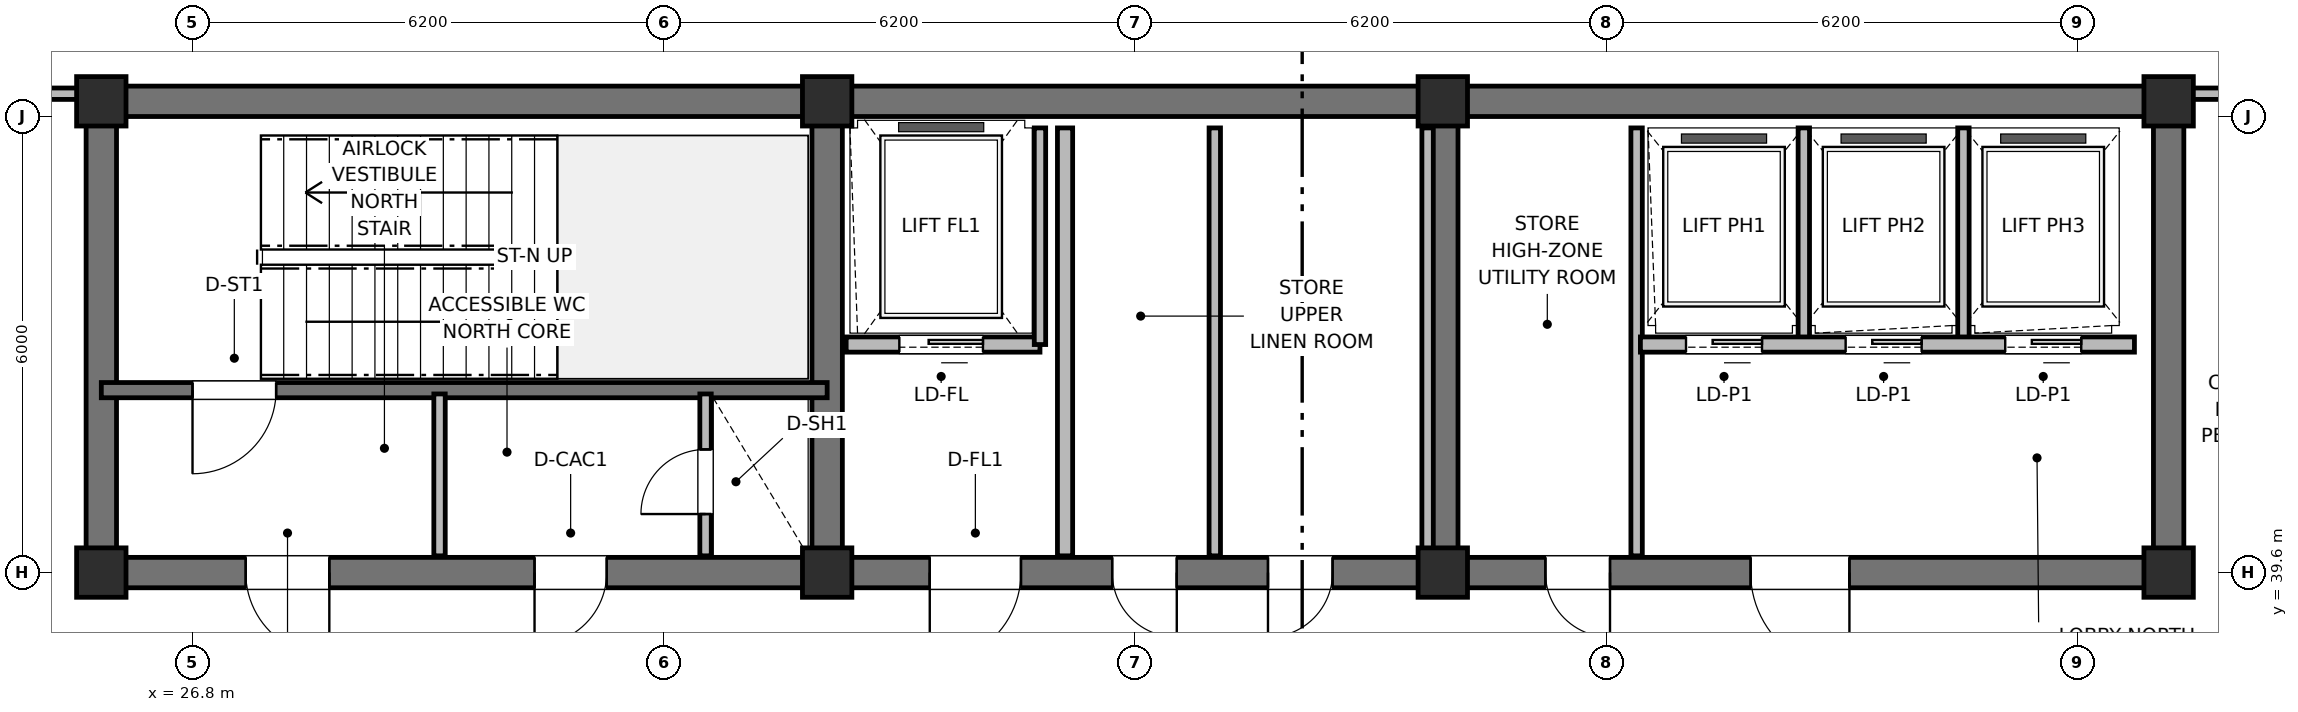
"""IFC4 building model, lengths in metres.
Left out: names, types, materials, properties, quantities, classifications, styles, units other than length and angle.
Written with IfcOpenShell. Run it as: python <this file> out.ifc"""

import sys

from ifc_helpers import new_model, si_unit, direction, frame, frame_2d, origin, origin_2d, place, context, subcontext, project, spatial, rectangle, extrude, element, fill, save


model = new_model("IFC4")
c1 = context("Model", 3, precision=1e-05, world=origin(), true_north=direction((0.0, 1.0)))
c2 = subcontext(c1, "Body", "Model", "MODEL_VIEW")
j1 = project(units=[si_unit("LENGTHUNIT", "METRE"), si_unit("PLANEANGLEUNIT", "RADIAN")], contexts=[c1])
p1 = place(None, origin())
s1 = spatial("IfcSite", under=j1, at=p1, CompositionType="ELEMENT")
p2 = place(p1, origin())
s2 = spatial("IfcBuilding", under=s1, at=p2, CompositionType="ELEMENT")
p3 = place(p2, frame((0.0, 0.0, 297.2)))
s3 = spatial("IfcBuildingStorey", under=s2, at=p3, CompositionType="ELEMENT", Elevation=297.2)
p4 = place(p3, frame((25.6, 45.8, 0.0), z_axis=(0.0, 0.0, 1.0), x_axis=(1.0, 0.0, 0.0)))
e1 = element("IfcWall", 1, at=p4, inside=s3, PredefinedType="SHEAR", context=c2, shape_type="SweptSolid", body=[
    extrude(rectangle(XDim=27.2, YDim=0.4, at=frame_2d((13.6, 0.0))), origin(), (0.0, 0.0, 1.0), 4.8),
])
for number, where, z_axis, x_axis in (
    (2, (25.6, 39.8, 0.0), (0.0, 0.0, 1.0), (0.0, 1.0, 0.0)),
    (3, (52.8, 39.8, 0.0), (0.0, 0.0, 1.0), (0.0, 1.0, 0.0)),
):
    element("IfcWall", number, at=place(p3, frame(where, z_axis=z_axis, x_axis=x_axis)), inside=s3, PredefinedType="SHEAR", context=c2, shape_type="SweptSolid", body=[
        extrude(rectangle(XDim=5.8, YDim=0.4, at=frame_2d((2.9, 0.0))), origin(), (0.0, 0.0, 1.0), 4.8),
    ])
p5 = place(p3, frame((52.8, 39.6, 0.0), z_axis=(0.0, 0.0, 1.0), x_axis=(-1.0, 0.0, 0.0)))
e4 = element("IfcWall", 4, at=p5, inside=s3, PredefinedType="SHEAR", context=c2, shape_type="SweptSolid", body=[
    extrude(rectangle(XDim=27.2, YDim=0.4, at=frame_2d((13.6, 0.0))), origin(), (0.0, 0.0, 1.0), 4.8),
])
p6 = place(p5, frame((24.2, 0.0, 0.0)))
e5 = element("IfcOpeningElement", 5, at=p6, cuts=e4, PredefinedType="OPENING", context=c2, shape_type="SweptSolid", body=[
    extrude(rectangle(XDim=1.1, YDim=2.15, at=frame_2d((0.55, 1.075))), frame((0.0, 0.21, 0.0), z_axis=(0.0, -1.0, 0.0), x_axis=(1.0, 0.0, 0.0)), (0.0, 0.0, 1.0), 0.42),
])
p7 = place(p5, frame((20.55, 0.0, 0.0)))
e6 = element("IfcOpeningElement", 6, at=p7, cuts=e4, PredefinedType="OPENING", context=c2, shape_type="SweptSolid", body=[
    extrude(rectangle(XDim=0.95, YDim=2.1, at=frame_2d((0.475, 1.05))), frame((0.0, 0.21, 0.0), z_axis=(0.0, -1.0, 0.0), x_axis=(1.0, 0.0, 0.0)), (0.0, 0.0, 1.0), 0.42),
])
p8 = place(p5, frame((15.1, 0.0, 0.0)))
e7 = element("IfcOpeningElement", 7, at=p8, cuts=e4, PredefinedType="OPENING", context=c2, shape_type="SweptSolid", body=[
    extrude(rectangle(XDim=1.2, YDim=2.15, at=frame_2d((0.6, 1.075))), frame((0.0, 0.21, 0.0), z_axis=(0.0, -1.0, 0.0), x_axis=(1.0, 0.0, 0.0)), (0.0, 0.0, 1.0), 0.42),
])
p9 = place(p5, frame((13.05, 0.0, 0.0)))
e8 = element("IfcOpeningElement", 8, at=p9, cuts=e4, PredefinedType="OPENING", context=c2, shape_type="SweptSolid", body=[
    extrude(rectangle(XDim=0.85, YDim=2.1, at=frame_2d((0.425, 1.05))), frame((0.0, 0.21, 0.0), z_axis=(0.0, -1.0, 0.0), x_axis=(1.0, 0.0, 0.0)), (0.0, 0.0, 1.0), 0.42),
])
p10 = place(p5, frame((11.0, 0.0, 0.0)))
e9 = element("IfcOpeningElement", 9, at=p10, cuts=e4, PredefinedType="OPENING", context=c2, shape_type="SweptSolid", body=[
    extrude(rectangle(XDim=0.85, YDim=2.1, at=frame_2d((0.425, 1.05))), frame((0.0, 0.21, 0.0), z_axis=(0.0, -1.0, 0.0), x_axis=(1.0, 0.0, 0.0)), (0.0, 0.0, 1.0), 0.42),
])
p11 = place(p5, frame((7.35, 0.0, 0.0)))
e10 = element("IfcOpeningElement", 10, at=p11, cuts=e4, PredefinedType="OPENING", context=c2, shape_type="SweptSolid", body=[
    extrude(rectangle(XDim=0.85, YDim=2.1, at=frame_2d((0.425, 1.05))), frame((0.0, 0.21, 0.0), z_axis=(0.0, -1.0, 0.0), x_axis=(1.0, 0.0, 0.0)), (0.0, 0.0, 1.0), 0.42),
])
p12 = place(p5, frame((4.2, 0.0, 0.0)))
e11 = element("IfcOpeningElement", 11, at=p12, cuts=e4, PredefinedType="OPENING", context=c2, shape_type="SweptSolid", body=[
    extrude(rectangle(XDim=1.3, YDim=2.2, at=frame_2d((0.65, 1.1))), frame((0.0, 0.21, 0.0), z_axis=(0.0, -1.0, 0.0), x_axis=(1.0, 0.0, 0.0)), (0.0, 0.0, 1.0), 0.42),
])
for number, where, z_axis, x_axis in (
    (12, (35.15, 39.8, 0.0), (0.0, 0.0, 1.0), (0.0, 1.0, 0.0)),
    (13, (43.25, 39.8, 0.0), (0.0, 0.0, 1.0), (0.0, 1.0, 0.0)),
):
    element("IfcWall", number, at=place(p3, frame(where, z_axis=z_axis, x_axis=x_axis)), inside=s3, PredefinedType="SHEAR", context=c2, shape_type="SweptSolid", body=[
        extrude(rectangle(XDim=5.8, YDim=0.4, at=frame_2d((2.9, 0.0))), origin(), (0.0, 0.0, 1.0), 4.8),
    ])
for number, where, z_axis, x_axis in (
    (14, (25.6, 39.6, 0.0), (0.0, 0.0, 1.0), (1.0, 0.0, 0.0)),
    (15, (25.6, 45.8, 0.0), (0.0, 0.0, 1.0), (1.0, 0.0, 0.0)),
    (16, (35.15, 39.6, 0.0), (0.0, 0.0, 1.0), (1.0, 0.0, 0.0)),
    (17, (35.15, 45.8, 0.0), (0.0, 0.0, 1.0), (1.0, 0.0, 0.0)),
    (18, (43.25, 39.6, 0.0), (0.0, 0.0, 1.0), (1.0, 0.0, 0.0)),
    (19, (43.25, 45.8, 0.0), (0.0, 0.0, 1.0), (1.0, 0.0, 0.0)),
    (20, (52.8, 39.6, 0.0), (0.0, 0.0, 1.0), (1.0, 0.0, 0.0)),
    (21, (52.8, 45.8, 0.0), (0.0, 0.0, 1.0), (1.0, 0.0, 0.0)),
):
    element("IfcColumn", number, at=place(p3, frame(where, z_axis=z_axis, x_axis=x_axis)), inside=s3, PredefinedType="COLUMN", context=c2, shape_type="SweptSolid", body=[
        extrude(rectangle(XDim=0.65, YDim=0.65, at=origin_2d()), origin(), (0.0, 0.0, 1.0), 4.8),
    ])
p13 = place(p3, frame((35.15, 42.0, 0.0), z_axis=(0.0, 0.0, 1.0), x_axis=(-1.0, 0.0, 0.0)))
e22 = element("IfcWall", 22, at=p13, inside=s3, PredefinedType="SHEAR", context=c2, shape_type="SweptSolid", body=[
    extrude(rectangle(XDim=9.55, YDim=0.2, at=frame_2d((4.775, 0.0))), origin(), (0.0, 0.0, 1.0), 4.8),
])
p14 = place(p13, frame((7.25, 0.0, 0.0)))
e23 = element("IfcOpeningElement", 23, at=p14, cuts=e22, PredefinedType="OPENING", context=c2, shape_type="SweptSolid", body=[
    extrude(rectangle(XDim=1.1, YDim=2.15, at=frame_2d((0.55, 1.075))), frame((0.0, 0.11, 0.0), z_axis=(0.0, -1.0, 0.0), x_axis=(1.0, 0.0, 0.0)), (0.0, 0.0, 1.0), 0.22),
])
p15 = place(p3, frame((33.55, 39.82, 0.0), z_axis=(0.0, 0.0, 1.0), x_axis=(0.0, 1.0, 0.0)))
e24 = element("IfcWall", 24, at=p15, inside=s3, PredefinedType="PARTITIONING", context=c2, shape_type="SweptSolid", body=[
    extrude(rectangle(XDim=2.13, YDim=0.15, at=frame_2d((1.065, 0.0))), origin(), (0.0, 0.0, 1.0), 2.56),
])
p16 = place(p15, frame((0.55, 0.0, 0.0)))
e25 = element("IfcOpeningElement", 25, at=p16, cuts=e24, PredefinedType="OPENING", context=c2, shape_type="SweptSolid", body=[
    extrude(rectangle(XDim=0.85, YDim=2.05, at=frame_2d((0.425, 1.025))), frame((0.0, 0.085, 0.0), z_axis=(0.0, -1.0, 0.0), x_axis=(1.0, 0.0, 0.0)), (0.0, 0.0, 1.0), 0.17),
])
p17 = place(p3, frame((30.05, 39.82, 0.0), z_axis=(0.0, 0.0, 1.0), x_axis=(0.0, 1.0, 0.0)))
e26 = element("IfcWall", 26, at=p17, inside=s3, PredefinedType="PARTITIONING", context=c2, shape_type="SweptSolid", body=[
    extrude(rectangle(XDim=2.13, YDim=0.15, at=frame_2d((1.065, 0.0))), origin(), (0.0, 0.0, 1.0), 2.56),
])
p18 = place(p3, frame((37.95, 42.6, 0.0), z_axis=(0.0, 0.0, 1.0), x_axis=(-1.0, 0.0, 0.0)))
e27 = element("IfcWall", 27, at=p18, inside=s3, PredefinedType="PARTITIONING", context=c2, shape_type="SweptSolid", body=[
    extrude(rectangle(XDim=2.55, YDim=0.2, at=frame_2d((1.275, 0.0))), origin(), (0.0, 0.0, 1.0), 2.56),
])
p19 = place(p18, frame((0.75, 0.0, 0.0)))
e28 = element("IfcOpeningElement", 28, at=p19, cuts=e27, PredefinedType="OPENING", context=c2, shape_type="SweptSolid", body=[
    extrude(rectangle(XDim=1.1, YDim=2.15, at=frame_2d((0.55, 1.075))), frame((0.0, 0.11, 0.0), z_axis=(0.0, -1.0, 0.0), x_axis=(1.0, 0.0, 0.0)), (0.0, 0.0, 1.0), 0.22),
])
p20 = place(p3, frame((37.95, 42.6, 0.0), z_axis=(0.0, 0.0, 1.0), x_axis=(0.0, 1.0, 0.0)))
e29 = element("IfcWall", 29, at=p20, inside=s3, PredefinedType="PARTITIONING", context=c2, shape_type="SweptSolid", body=[
    extrude(rectangle(XDim=2.85, YDim=0.15, at=frame_2d((1.425, 0.0))), origin(), (0.0, 0.0, 1.0), 2.56),
])
p21 = place(p3, frame((38.28, 39.82, 0.0), z_axis=(0.0, 0.0, 1.0), x_axis=(0.0, 1.0, 0.0)))
e30 = element("IfcWall", 30, at=p21, inside=s3, PredefinedType="PARTITIONING", context=c2, shape_type="SweptSolid", body=[
    extrude(rectangle(XDim=5.63, YDim=0.2, at=frame_2d((2.815, 0.0))), origin(), (0.0, 0.0, 1.0), 2.56),
])
for number, where, z_axis, x_axis in (
    (31, (43.05, 39.82, 0.0), (0.0, 0.0, 1.0), (0.0, 1.0, 0.0)),
    (32, (40.25, 39.82, 0.0), (0.0, 0.0, 1.0), (0.0, 1.0, 0.0)),
    (33, (45.8, 39.82, 0.0), (0.0, 0.0, 1.0), (0.0, 1.0, 0.0)),
):
    element("IfcWall", number, at=place(p3, frame(where, z_axis=z_axis, x_axis=x_axis)), inside=s3, PredefinedType="PARTITIONING", context=c2, shape_type="SweptSolid", body=[
        extrude(rectangle(XDim=5.63, YDim=0.15, at=frame_2d((2.815, 0.0))), origin(), (0.0, 0.0, 1.0), 2.56),
    ])
for number, where, z_axis, x_axis in (
    (34, (48.0, 42.65, 0.0), (0.0, 0.0, 1.0), (0.0, 1.0, 0.0)),
    (35, (50.1, 42.65, 0.0), (0.0, 0.0, 1.0), (0.0, 1.0, 0.0)),
):
    element("IfcWall", number, at=place(p3, frame(where, z_axis=z_axis, x_axis=x_axis)), inside=s3, PredefinedType="PARTITIONING", context=c2, shape_type="SweptSolid", body=[
        extrude(rectangle(XDim=2.8, YDim=0.15, at=frame_2d((1.4, 0.0))), origin(), (0.0, 0.0, 1.0), 2.56),
    ])
p22 = place(p3, frame((52.35, 42.6, 0.0), z_axis=(0.0, 0.0, 1.0), x_axis=(-1.0, 0.0, 0.0)))
e36 = element("IfcWall", 36, at=p22, inside=s3, PredefinedType="PARTITIONING", context=c2, shape_type="SweptSolid", body=[
    extrude(rectangle(XDim=6.5, YDim=0.2, at=frame_2d((3.25, 0.0))), origin(), (0.0, 0.0, 1.0), 2.56),
])
p23 = place(p22, frame((4.9, 0.0, 0.0)))
e37 = element("IfcOpeningElement", 37, at=p23, cuts=e36, PredefinedType="OPENING", context=c2, shape_type="SweptSolid", body=[
    extrude(rectangle(XDim=1.0, YDim=2.15, at=frame_2d((0.5, 1.075))), frame((0.0, 0.11, 0.0), z_axis=(0.0, -1.0, 0.0), x_axis=(1.0, 0.0, 0.0)), (0.0, 0.0, 1.0), 0.22),
])
p24 = place(p22, frame((2.8, 0.0, 0.0)))
e38 = element("IfcOpeningElement", 38, at=p24, cuts=e36, PredefinedType="OPENING", context=c2, shape_type="SweptSolid", body=[
    extrude(rectangle(XDim=1.0, YDim=2.15, at=frame_2d((0.5, 1.075))), frame((0.0, 0.11, 0.0), z_axis=(0.0, -1.0, 0.0), x_axis=(1.0, 0.0, 0.0)), (0.0, 0.0, 1.0), 0.22),
])
p25 = place(p22, frame((0.7, 0.0, 0.0)))
e39 = element("IfcOpeningElement", 39, at=p25, cuts=e36, PredefinedType="OPENING", context=c2, shape_type="SweptSolid", body=[
    extrude(rectangle(XDim=1.0, YDim=2.15, at=frame_2d((0.5, 1.075))), frame((0.0, 0.11, 0.0), z_axis=(0.0, -1.0, 0.0), x_axis=(1.0, 0.0, 0.0)), (0.0, 0.0, 1.0), 0.22),
])
p26 = place(p3, frame((20.44, 45.9, 0.0), z_axis=(0.0, 0.0, 1.0), x_axis=(1.0, 0.0, 0.0)))
e40 = element("IfcWall", 40, at=p26, inside=s3, PredefinedType="PARTITIONING", context=c2, shape_type="SweptSolid", body=[
    extrude(rectangle(XDim=4.86, YDim=0.15, at=frame_2d((2.43, 0.0))), origin(), (0.0, 0.0, 1.0), 2.56),
])
p27 = place(p3, frame((53.1, 45.9, 0.0), z_axis=(0.0, 0.0, 1.0), x_axis=(1.0, 0.0, 0.0)))
e41 = element("IfcWall", 41, at=p27, inside=s3, PredefinedType="PARTITIONING", context=c2, shape_type="SweptSolid", body=[
    extrude(rectangle(XDim=4.86, YDim=0.15, at=frame_2d((2.43, 0.0))), origin(), (0.0, 0.0, 1.0), 2.56),
])
p28 = place(p14, origin())
e42 = element("IfcDoor", 42, at=p28, inside=s3, OperationType="SINGLE_SWING_RIGHT", PredefinedType="DOOR", context=c2, shape_type="SweptSolid", body=[
    extrude(rectangle(XDim=1.1, YDim=2.15, at=frame_2d((0.55, 1.075))), frame((0.0, 0.025, 0.0), z_axis=(0.0, -1.0, 0.0), x_axis=(1.0, 0.0, 0.0)), (0.0, 0.0, 1.0), 0.05),
])
fill(e23, e42)
p29 = place(p16, origin())
e43 = element("IfcDoor", 43, at=p29, inside=s3, OperationType="SINGLE_SWING_LEFT", PredefinedType="TRAPDOOR", context=c2, shape_type="SweptSolid", body=[
    extrude(rectangle(XDim=0.85, YDim=2.05, at=frame_2d((0.425, 1.025))), frame((0.0, 0.025, 0.0), z_axis=(0.0, -1.0, 0.0), x_axis=(1.0, 0.0, 0.0)), (0.0, 0.0, 1.0), 0.05),
])
fill(e25, e43)
p30 = place(p19, origin())
e44 = element("IfcDoor", 44, at=p30, inside=s3, OperationType="SLIDING_TO_LEFT", PredefinedType="DOOR", context=c2, shape_type="SweptSolid", body=[
    extrude(rectangle(XDim=1.1, YDim=2.15, at=frame_2d((0.55, 1.075))), frame((0.0, 0.025, 0.0), z_axis=(0.0, -1.0, 0.0), x_axis=(1.0, 0.0, 0.0)), (0.0, 0.0, 1.0), 0.05),
])
fill(e28, e44)
p31 = place(p23, origin())
e45 = element("IfcDoor", 45, at=p31, inside=s3, OperationType="SLIDING_TO_LEFT", PredefinedType="DOOR", context=c2, shape_type="SweptSolid", body=[
    extrude(rectangle(XDim=1.0, YDim=2.15, at=frame_2d((0.5, 1.075))), frame((0.0, 0.025, 0.0), z_axis=(0.0, -1.0, 0.0), x_axis=(1.0, 0.0, 0.0)), (0.0, 0.0, 1.0), 0.05),
])
fill(e37, e45)
p32 = place(p24, origin())
e46 = element("IfcDoor", 46, at=p32, inside=s3, OperationType="SLIDING_TO_LEFT", PredefinedType="DOOR", context=c2, shape_type="SweptSolid", body=[
    extrude(rectangle(XDim=1.0, YDim=2.15, at=frame_2d((0.5, 1.075))), frame((0.0, 0.025, 0.0), z_axis=(0.0, -1.0, 0.0), x_axis=(1.0, 0.0, 0.0)), (0.0, 0.0, 1.0), 0.05),
])
fill(e38, e46)
p33 = place(p25, origin())
e47 = element("IfcDoor", 47, at=p33, inside=s3, OperationType="SLIDING_TO_LEFT", PredefinedType="DOOR", context=c2, shape_type="SweptSolid", body=[
    extrude(rectangle(XDim=1.0, YDim=2.15, at=frame_2d((0.5, 1.075))), frame((0.0, 0.025, 0.0), z_axis=(0.0, -1.0, 0.0), x_axis=(1.0, 0.0, 0.0)), (0.0, 0.0, 1.0), 0.05),
])
fill(e39, e47)
p34 = place(p6, origin())
e48 = element("IfcDoor", 48, at=p34, inside=s3, OperationType="SINGLE_SWING_LEFT", PredefinedType="DOOR", context=c2, shape_type="SweptSolid", body=[
    extrude(rectangle(XDim=1.1, YDim=2.15, at=frame_2d((0.55, 1.075))), frame((0.0, 0.025, 0.0), z_axis=(0.0, -1.0, 0.0), x_axis=(1.0, 0.0, 0.0)), (0.0, 0.0, 1.0), 0.05),
])
fill(e5, e48)
p35 = place(p7, origin())
e49 = element("IfcDoor", 49, at=p35, inside=s3, OperationType="SINGLE_SWING_RIGHT", PredefinedType="DOOR", context=c2, shape_type="SweptSolid", body=[
    extrude(rectangle(XDim=0.95, YDim=2.1, at=frame_2d((0.475, 1.05))), frame((0.0, 0.025, 0.0), z_axis=(0.0, -1.0, 0.0), x_axis=(1.0, 0.0, 0.0)), (0.0, 0.0, 1.0), 0.05),
])
fill(e6, e49)
p36 = place(p8, origin())
e50 = element("IfcDoor", 50, at=p36, inside=s3, OperationType="SINGLE_SWING_RIGHT", PredefinedType="DOOR", context=c2, shape_type="SweptSolid", body=[
    extrude(rectangle(XDim=1.2, YDim=2.15, at=frame_2d((0.6, 1.075))), frame((0.0, 0.025, 0.0), z_axis=(0.0, -1.0, 0.0), x_axis=(1.0, 0.0, 0.0)), (0.0, 0.0, 1.0), 0.05),
])
fill(e7, e50)
p37 = place(p9, origin())
e51 = element("IfcDoor", 51, at=p37, inside=s3, OperationType="SINGLE_SWING_LEFT", PredefinedType="DOOR", context=c2, shape_type="SweptSolid", body=[
    extrude(rectangle(XDim=0.85, YDim=2.1, at=frame_2d((0.425, 1.05))), frame((0.0, 0.025, 0.0), z_axis=(0.0, -1.0, 0.0), x_axis=(1.0, 0.0, 0.0)), (0.0, 0.0, 1.0), 0.05),
])
fill(e8, e51)
p38 = place(p10, origin())
e52 = element("IfcDoor", 52, at=p38, inside=s3, OperationType="SINGLE_SWING_RIGHT", PredefinedType="DOOR", context=c2, shape_type="SweptSolid", body=[
    extrude(rectangle(XDim=0.85, YDim=2.1, at=frame_2d((0.425, 1.05))), frame((0.0, 0.025, 0.0), z_axis=(0.0, -1.0, 0.0), x_axis=(1.0, 0.0, 0.0)), (0.0, 0.0, 1.0), 0.05),
])
fill(e9, e52)
p39 = place(p11, origin())
e53 = element("IfcDoor", 53, at=p39, inside=s3, OperationType="SINGLE_SWING_LEFT", PredefinedType="DOOR", context=c2, shape_type="SweptSolid", body=[
    extrude(rectangle(XDim=0.85, YDim=2.1, at=frame_2d((0.425, 1.05))), frame((0.0, 0.025, 0.0), z_axis=(0.0, -1.0, 0.0), x_axis=(1.0, 0.0, 0.0)), (0.0, 0.0, 1.0), 0.05),
])
fill(e10, e53)
p40 = place(p12, origin())
e54 = element("IfcDoor", 54, at=p40, inside=s3, OperationType="SINGLE_SWING_LEFT", PredefinedType="DOOR", context=c2, shape_type="SweptSolid", body=[
    extrude(rectangle(XDim=1.3, YDim=2.2, at=frame_2d((0.65, 1.1))), frame((0.0, 0.025, 0.0), z_axis=(0.0, -1.0, 0.0), x_axis=(1.0, 0.0, 0.0)), (0.0, 0.0, 1.0), 0.05),
])
fill(e11, e54)
save(model, sys.argv[1])
